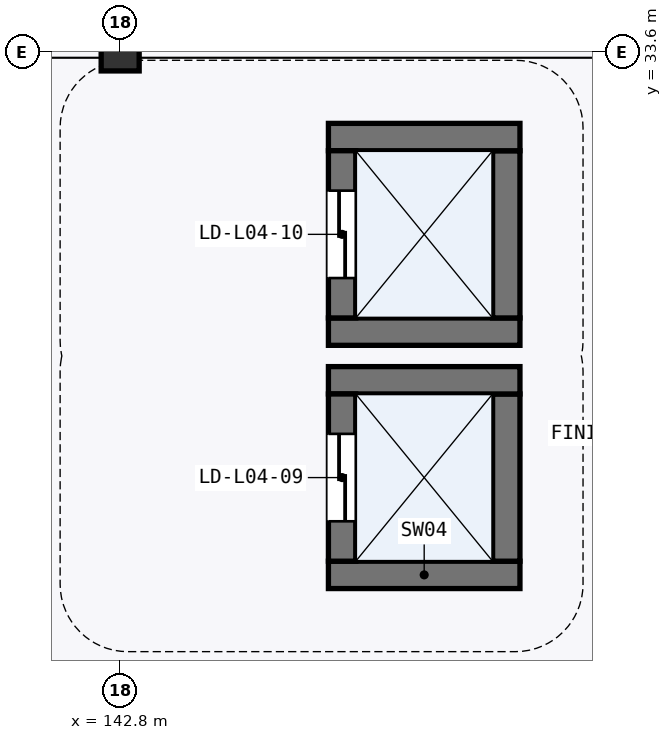
"""IFC4 building model, lengths in metres.
Left out: names, types, materials, properties, quantities, classifications, styles, units other than length and angle.
Written with IfcOpenShell. Run it as: python <this file> out.ifc"""

import sys

from ifc_helpers import new_model, si_unit, direction, frame, frame_2d, origin, origin_2d, place, context, subcontext, project, spatial, rectangle, hollow_rectangle, extrude, element, fill, save


model = new_model("IFC4")
c1 = context("Model", 3, precision=1e-05, world=origin(), true_north=direction((0.0, 1.0)))
c2 = subcontext(c1, "Body", "Model", "MODEL_VIEW")
j1 = project(units=[si_unit("LENGTHUNIT", "METRE"), si_unit("PLANEANGLEUNIT", "RADIAN")], contexts=[c1])
p1 = place(None, origin())
s1 = spatial("IfcSite", under=j1, at=p1, CompositionType="ELEMENT")
p2 = place(p1, origin())
s2 = spatial("IfcBuilding", under=s1, at=p2, CompositionType="ELEMENT")
p3 = place(p2, frame((0.0, 0.0, 16.5)))
s3 = spatial("IfcBuildingStorey", under=s2, at=p3, CompositionType="ELEMENT", Elevation=16.5)
p4 = place(p3, frame((142.8, 33.6, 0.0), z_axis=(0.0, 0.0, 1.0), x_axis=(1.0, 0.0, 0.0)))
e1 = element("IfcColumn", 1, at=p4, inside=s3, PredefinedType="COLUMN", context=c2, shape_type="SweptSolid", body=[
    extrude(hollow_rectangle(XDim=0.5, YDim=0.5, WallThickness=0.02, at=origin_2d()), origin(), (0.0, 0.0, 1.0), 5.1),
])
p5 = place(p3, frame((145.54, 26.72, 0.0), z_axis=(0.0, 0.0, 1.0), x_axis=(1.0, 0.0, 0.0)))
e2 = element("IfcWall", 2, at=p5, inside=s3, PredefinedType="SHEAR", context=c2, shape_type="SweptSolid", body=[
    extrude(rectangle(XDim=2.52, YDim=0.36, at=frame_2d((1.26, 0.0))), origin(), (0.0, 0.0, 1.0), 4.845),
])
p6 = place(p3, frame((147.88, 26.9, 0.0), z_axis=(0.0, 0.0, 1.0), x_axis=(0.0, 1.0, 0.0)))
e3 = element("IfcWall", 3, at=p6, inside=s3, PredefinedType="SHEAR", context=c2, shape_type="SweptSolid", body=[
    extrude(rectangle(XDim=2.2, YDim=0.36, at=frame_2d((1.1, 0.0))), origin(), (0.0, 0.0, 1.0), 4.845),
])
p7 = place(p3, frame((148.06, 29.28, 0.0), z_axis=(0.0, 0.0, 1.0), x_axis=(-1.0, 0.0, 0.0)))
e4 = element("IfcWall", 4, at=p7, inside=s3, PredefinedType="SHEAR", context=c2, shape_type="SweptSolid", body=[
    extrude(rectangle(XDim=2.52, YDim=0.36, at=frame_2d((1.26, 0.0))), origin(), (0.0, 0.0, 1.0), 4.845),
])
p8 = place(p3, frame((145.72, 29.1, 0.0), z_axis=(0.0, 0.0, 1.0), x_axis=(0.0, -1.0, 0.0)))
e5 = element("IfcWall", 5, at=p8, inside=s3, PredefinedType="SHEAR", context=c2, shape_type="SweptSolid", body=[
    extrude(rectangle(XDim=2.2, YDim=0.36, at=frame_2d((1.1, 0.0))), origin(), (0.0, 0.0, 1.0), 4.845),
])
p9 = place(p8, frame((0.525, 0.0, 0.0)))
e6 = element("IfcOpeningElement", 6, at=p9, cuts=e5, PredefinedType="OPENING", context=c2, shape_type="SweptSolid", body=[
    extrude(rectangle(XDim=1.15, YDim=2.2, at=frame_2d((0.575, 1.1))), frame((0.0, 0.19, 0.0), z_axis=(0.0, -1.0, 0.0), x_axis=(1.0, 0.0, 0.0)), (0.0, 0.0, 1.0), 0.38),
])
p10 = place(p3, frame((145.54, 29.92, 0.0), z_axis=(0.0, 0.0, 1.0), x_axis=(1.0, 0.0, 0.0)))
e7 = element("IfcWall", 7, at=p10, inside=s3, PredefinedType="SHEAR", context=c2, shape_type="SweptSolid", body=[
    extrude(rectangle(XDim=2.52, YDim=0.36, at=frame_2d((1.26, 0.0))), origin(), (0.0, 0.0, 1.0), 4.845),
])
p11 = place(p3, frame((147.88, 30.1, 0.0), z_axis=(0.0, 0.0, 1.0), x_axis=(0.0, 1.0, 0.0)))
e8 = element("IfcWall", 8, at=p11, inside=s3, PredefinedType="SHEAR", context=c2, shape_type="SweptSolid", body=[
    extrude(rectangle(XDim=2.2, YDim=0.36, at=frame_2d((1.1, 0.0))), origin(), (0.0, 0.0, 1.0), 4.845),
])
p12 = place(p3, frame((148.06, 32.48, 0.0), z_axis=(0.0, 0.0, 1.0), x_axis=(-1.0, 0.0, 0.0)))
e9 = element("IfcWall", 9, at=p12, inside=s3, PredefinedType="SHEAR", context=c2, shape_type="SweptSolid", body=[
    extrude(rectangle(XDim=2.52, YDim=0.36, at=frame_2d((1.26, 0.0))), origin(), (0.0, 0.0, 1.0), 4.845),
])
p13 = place(p3, frame((145.72, 32.3, 0.0), z_axis=(0.0, 0.0, 1.0), x_axis=(0.0, -1.0, 0.0)))
e10 = element("IfcWall", 10, at=p13, inside=s3, PredefinedType="SHEAR", context=c2, shape_type="SweptSolid", body=[
    extrude(rectangle(XDim=2.2, YDim=0.36, at=frame_2d((1.1, 0.0))), origin(), (0.0, 0.0, 1.0), 4.845),
])
p14 = place(p13, frame((0.525, 0.0, 0.0)))
e11 = element("IfcOpeningElement", 11, at=p14, cuts=e10, PredefinedType="OPENING", context=c2, shape_type="SweptSolid", body=[
    extrude(rectangle(XDim=1.15, YDim=2.2, at=frame_2d((0.575, 1.1))), frame((0.0, 0.19, 0.0), z_axis=(0.0, -1.0, 0.0), x_axis=(1.0, 0.0, 0.0)), (0.0, 0.0, 1.0), 0.38),
])
p15 = place(p9, frame((1.15, 0.0, 0.0), z_axis=(0.0, 0.0, 1.0), x_axis=(-1.0, 0.0, 0.0)))
e12 = element("IfcDoor", 12, at=p15, inside=s3, OperationType="DOUBLE_DOOR_SLIDING", PredefinedType="DOOR", context=c2, shape_type="SweptSolid", body=[
    extrude(rectangle(XDim=1.15, YDim=2.2, at=frame_2d((0.575, 1.1))), frame((0.0, 0.025, 0.0), z_axis=(0.0, -1.0, 0.0), x_axis=(1.0, 0.0, 0.0)), (0.0, 0.0, 1.0), 0.05),
])
fill(e6, e12)
p16 = place(p14, frame((1.15, 0.0, 0.0), z_axis=(0.0, 0.0, 1.0), x_axis=(-1.0, 0.0, 0.0)))
e13 = element("IfcDoor", 13, at=p16, inside=s3, OperationType="DOUBLE_DOOR_SLIDING", PredefinedType="DOOR", context=c2, shape_type="SweptSolid", body=[
    extrude(rectangle(XDim=1.15, YDim=2.2, at=frame_2d((0.575, 1.1))), frame((0.0, 0.025, 0.0), z_axis=(0.0, -1.0, 0.0), x_axis=(1.0, 0.0, 0.0)), (0.0, 0.0, 1.0), 0.05),
])
fill(e11, e13)
save(model, sys.argv[1])
